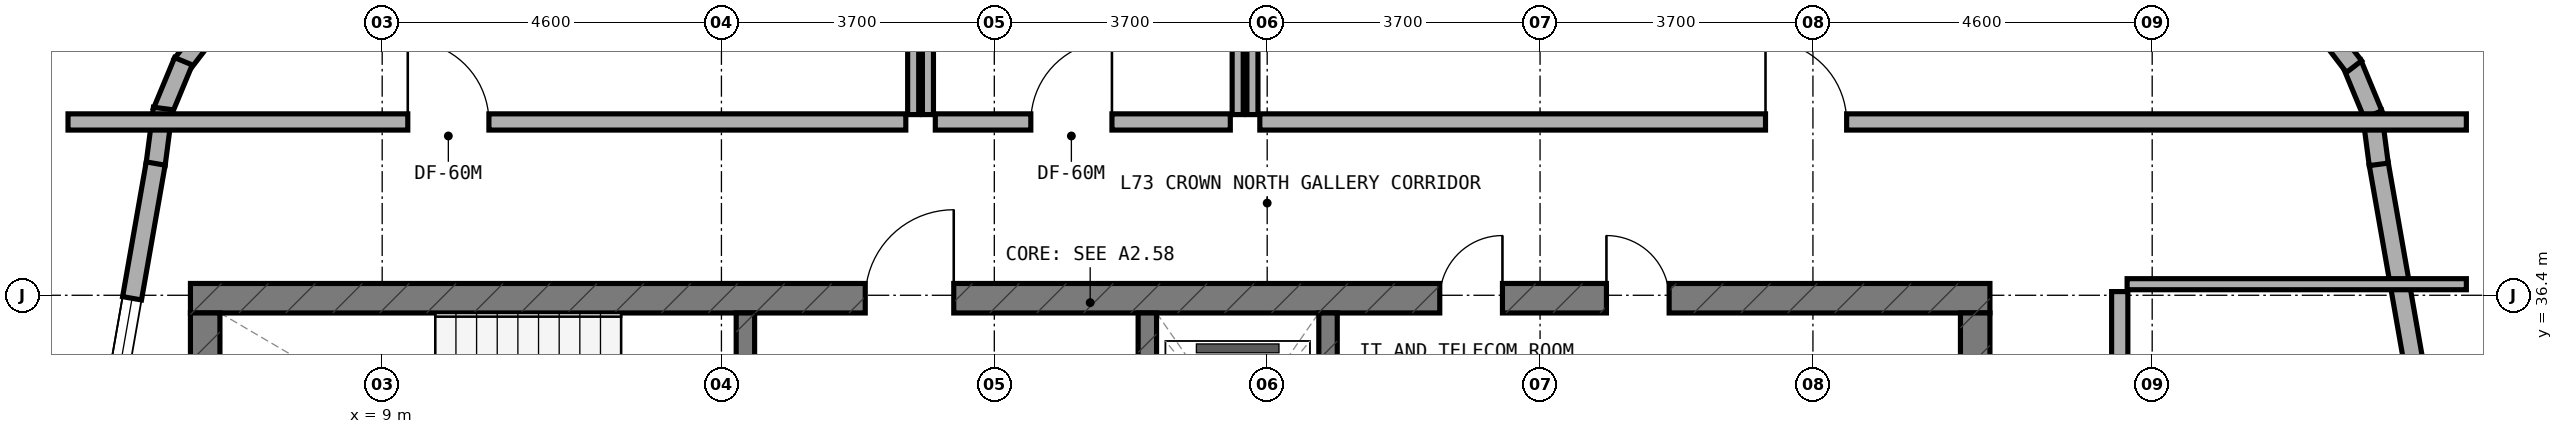
"""IFC4 building model, lengths in metres.
Left out: names, types, materials, properties, quantities, classifications, styles, units other than length and angle.
Written with IfcOpenShell. Run it as: python <this file> out.ifc"""

import sys

from ifc_helpers import new_model, si_unit, direction, frame, frame_2d, origin, place, context, subcontext, project, spatial, rectangle, extrude, element, fill, save


model = new_model("IFC4")
c1 = context("Model", 3, precision=1e-05, world=origin(), true_north=direction((0.0, 1.0)))
c2 = subcontext(c1, "Body", "Model", "MODEL_VIEW")
j1 = project(units=[si_unit("LENGTHUNIT", "METRE"), si_unit("PLANEANGLEUNIT", "RADIAN")], contexts=[c1])
p1 = place(None, origin())
s1 = spatial("IfcSite", under=j1, at=p1, CompositionType="ELEMENT")
p2 = place(p1, origin())
s2 = spatial("IfcBuilding", under=s1, at=p2, CompositionType="ELEMENT")
p3 = place(p2, frame((0.0, 0.0, 268.4)))
s3 = spatial("IfcBuildingStorey", under=s2, at=p3, CompositionType="ELEMENT", Elevation=268.4)
p4 = place(p3, frame((6.4, 36.36, 0.0), z_axis=(0.0, 0.0, 1.0), x_axis=(1.0, 0.0, 0.0)))
e1 = element("IfcWall", 1, at=p4, inside=s3, PredefinedType="SHEAR", context=c2, shape_type="SweptSolid", body=[
    extrude(rectangle(XDim=24.4, YDim=0.4, at=frame_2d((12.2, 0.0))), origin(), (0.0, 0.0, 1.0), 3.6),
])
p5 = place(p4, frame((9.15, 0.0, 0.0)))
e2 = element("IfcOpeningElement", 2, at=p5, cuts=e1, PredefinedType="OPENING", context=c2, shape_type="SweptSolid", body=[
    extrude(rectangle(XDim=1.2, YDim=2.15, at=frame_2d((0.6, 1.075))), frame((0.0, 0.21, 0.0), z_axis=(0.0, -1.0, 0.0), x_axis=(1.0, 0.0, 0.0)), (0.0, 0.0, 1.0), 0.42),
])
p6 = place(p4, frame((19.2, 0.0, 0.0)))
e3 = element("IfcOpeningElement", 3, at=p6, cuts=e1, PredefinedType="OPENING", context=c2, shape_type="SweptSolid", body=[
    extrude(rectangle(XDim=0.85, YDim=2.1, at=frame_2d((0.425, 1.05))), frame((0.0, 0.21, 0.0), z_axis=(0.0, -1.0, 0.0), x_axis=(1.0, 0.0, 0.0)), (0.0, 0.0, 1.0), 0.42),
])
p7 = place(p4, frame((16.94, 0.0, 0.0)))
e4 = element("IfcOpeningElement", 4, at=p7, cuts=e1, PredefinedType="OPENING", context=c2, shape_type="SweptSolid", body=[
    extrude(rectangle(XDim=0.85, YDim=2.1, at=frame_2d((0.425, 1.05))), frame((0.0, 0.21, 0.0), z_axis=(0.0, -1.0, 0.0), x_axis=(1.0, 0.0, 0.0)), (0.0, 0.0, 1.0), 0.42),
])
for number, where, z_axis, x_axis in (
    (5, (6.6, 33.0, 0.0), (0.0, 0.0, 1.0), (0.0, 1.0, 0.0)),
    (6, (30.6, 33.0, 0.0), (0.0, 0.0, 1.0), (0.0, 1.0, 0.0)),
):
    element("IfcWall", number, at=place(p3, frame(where, z_axis=z_axis, x_axis=x_axis)), inside=s3, PredefinedType="SHEAR", context=c2, shape_type="SweptSolid", body=[
        extrude(rectangle(XDim=3.16, YDim=0.4, at=frame_2d((1.58, 0.0))), origin(), (0.0, 0.0, 1.0), 3.6),
    ])
p8 = place(p3, frame((13.925, 33.0, 0.0), z_axis=(0.0, 0.0, 1.0), x_axis=(0.0, 1.0, 0.0)))
e7 = element("IfcWall", 7, at=p8, inside=s3, PredefinedType="STANDARD", context=c2, shape_type="SweptSolid", body=[
    extrude(rectangle(XDim=3.16, YDim=0.25, at=frame_2d((1.58, 0.0))), origin(), (0.0, 0.0, 1.0), 3.32),
])
p9 = place(p8, frame((0.98, 0.0, 0.0)))
e8 = element("IfcOpeningElement", 8, at=p9, cuts=e7, PredefinedType="OPENING", context=c2, shape_type="SweptSolid", body=[
    extrude(rectangle(XDim=1.1, YDim=2.15, at=frame_2d((0.55, 1.075))), frame((0.0, 0.135, 0.0), z_axis=(0.0, -1.0, 0.0), x_axis=(1.0, 0.0, 0.0)), (0.0, 0.0, 1.0), 0.27),
])
p10 = place(p3, frame((19.375, 33.0, 0.0), z_axis=(0.0, 0.0, 1.0), x_axis=(0.0, 1.0, 0.0)))
e9 = element("IfcWall", 9, at=p10, inside=s3, PredefinedType="STANDARD", context=c2, shape_type="SweptSolid", body=[
    extrude(rectangle(XDim=3.16, YDim=0.25, at=frame_2d((1.58, 0.0))), origin(), (0.0, 0.0, 1.0), 3.32),
])
p11 = place(p10, frame((0.98, 0.0, 0.0)))
e10 = element("IfcOpeningElement", 10, at=p11, cuts=e9, PredefinedType="OPENING", context=c2, shape_type="SweptSolid", body=[
    extrude(rectangle(XDim=1.1, YDim=2.15, at=frame_2d((0.55, 1.075))), frame((0.0, 0.135, 0.0), z_axis=(0.0, -1.0, 0.0), x_axis=(1.0, 0.0, 0.0)), (0.0, 0.0, 1.0), 0.27),
])
p12 = place(p3, frame((21.825, 33.0, 0.0), z_axis=(0.0, 0.0, 1.0), x_axis=(0.0, 1.0, 0.0)))
e11 = element("IfcWall", 11, at=p12, inside=s3, PredefinedType="STANDARD", context=c2, shape_type="SweptSolid", body=[
    extrude(rectangle(XDim=3.16, YDim=0.25, at=frame_2d((1.58, 0.0))), origin(), (0.0, 0.0, 1.0), 3.32),
])
p13 = place(p3, frame((37.482, 30.144, 0.0), z_axis=(0.0, 0.0, 1.0), x_axis=(-0.172801004781, 0.98495675679, 0.0)))
e12 = element("IfcWall", 12, at=p13, inside=s3, PredefinedType="STANDARD", context=c2, shape_type="SweptSolid", body=[
    extrude(rectangle(XDim=8.165, YDim=0.26, at=frame_2d((4.083, 0.0))), origin(), (0.0, 0.0, 1.0), 3.32),
])
p14 = place(p13, frame((2.144, 0.0, 0.85)))
e13 = element("IfcOpeningElement", 13, at=p14, cuts=e12, PredefinedType="OPENING", context=c2, shape_type="SweptSolid", body=[
    extrude(rectangle(XDim=2.1, YDim=1.5, at=frame_2d((1.05, 0.75))), frame((0.0, 0.14, 0.0), z_axis=(0.0, -1.0, 0.0), x_axis=(1.0, 0.0, 0.0)), (0.0, 0.0, 1.0), 0.28),
])
p15 = place(p3, frame((36.072, 38.175, 0.0), z_axis=(0.0, 0.0, 1.0), x_axis=(-0.130255288807, 0.991480488834, 0.0)))
e14 = element("IfcWall", 14, at=p15, inside=s3, PredefinedType="STANDARD", context=c2, shape_type="SweptSolid", body=[
    extrude(rectangle(XDim=0.729, YDim=0.26, at=frame_2d((0.365, 0.0))), origin(), (0.0, 0.0, 1.0), 3.32),
])
for number, where, z_axis, x_axis in (
    (15, (35.995, 38.852, 0.0), (0.0, 0.0, 1.0), (-0.384, 0.924, 0.0)),
    (16, (35.737, 39.501, 0.0), (0.0, 0.0, 1.0), (-0.609, 0.793, 0.0)),
    (17, (6.738, 40.121, 0.0), (0.0, 0.0, 1.0), (-0.609, -0.793, 0.0)),
):
    element("IfcWall", number, at=place(p3, frame(where, z_axis=z_axis, x_axis=x_axis)), inside=s3, PredefinedType="STANDARD", context=c2, shape_type="SweptSolid", body=[
        extrude(rectangle(XDim=0.746, YDim=0.26, at=frame_2d((0.373, 0.0))), origin(), (0.0, 0.0, 1.0), 3.32),
    ])
p16 = place(p3, frame((6.305, 39.573, 0.0), z_axis=(0.0, 0.0, 1.0), x_axis=(-0.383267045233, -0.923637576129, 0.0)))
e18 = element("IfcWall", 18, at=p16, inside=s3, PredefinedType="STANDARD", context=c2, shape_type="SweptSolid", body=[
    extrude(rectangle(XDim=0.746, YDim=0.26, at=frame_2d((0.373, 0.0))), origin(), (0.0, 0.0, 1.0), 3.32),
])
p17 = place(p3, frame((6.027, 38.933, 0.0), z_axis=(0.0, 0.0, 1.0), x_axis=(-0.129653178221, -0.991559404866, 0.0)))
e19 = element("IfcWall", 19, at=p17, inside=s3, PredefinedType="STANDARD", context=c2, shape_type="SweptSolid", body=[
    extrude(rectangle(XDim=0.764, YDim=0.26, at=frame_2d((0.382, 0.0))), origin(), (0.0, 0.0, 1.0), 3.32),
])
p18 = place(p3, frame((5.929, 38.186, 0.0), z_axis=(0.0, 0.0, 1.0), x_axis=(-0.172801004781, -0.98495675679, 0.0)))
e20 = element("IfcWall", 20, at=p18, inside=s3, PredefinedType="STANDARD", context=c2, shape_type="SweptSolid", body=[
    extrude(rectangle(XDim=8.165, YDim=0.26, at=frame_2d((4.083, 0.0))), origin(), (0.0, 0.0, 1.0), 3.32),
])
p19 = place(p18, frame((1.855, 0.0, 0.85)))
e21 = element("IfcOpeningElement", 21, at=p19, cuts=e20, PredefinedType="OPENING", context=c2, shape_type="SweptSolid", body=[
    extrude(rectangle(XDim=2.1, YDim=1.5, at=frame_2d((1.05, 0.75))), frame((0.0, 0.14, 0.0), z_axis=(0.0, -1.0, 0.0), x_axis=(1.0, 0.0, 0.0)), (0.0, 0.0, 1.0), 0.28),
])
p20 = place(p18, frame((6.348, 0.0, 0.85)))
e22 = element("IfcOpeningElement", 22, at=p20, cuts=e20, PredefinedType="OPENING", context=c2, shape_type="SweptSolid", body=[
    extrude(rectangle(XDim=1.5, YDim=1.5, at=frame_2d((0.75, 0.75))), frame((0.0, 0.14, 0.0), z_axis=(0.0, -1.0, 0.0), x_axis=(1.0, 0.0, 0.0)), (0.0, 0.0, 1.0), 0.28),
])
p21 = place(p3, frame((32.66, 36.55, 0.0), z_axis=(0.0, 0.0, 1.0), x_axis=(1.0, 0.0, 0.0)))
e23 = element("IfcWall", 23, at=p21, inside=s3, PredefinedType="PARTITIONING", context=c2, shape_type="SweptSolid", body=[
    extrude(rectangle(XDim=4.6, YDim=0.15, at=frame_2d((2.3, 0.0))), origin(), (0.0, 0.0, 1.0), 2.795),
])
p22 = place(p3, frame((32.56, 13.55, 0.0), z_axis=(0.0, 0.0, 1.0), x_axis=(0.0, 1.0, 0.0)))
e24 = element("IfcWall", 24, at=p22, inside=s3, PredefinedType="SOLIDWALL", context=c2, shape_type="SweptSolid", body=[
    extrude(rectangle(XDim=22.9, YDim=0.22, at=frame_2d((11.45, 0.0))), origin(), (0.0, 0.0, 1.0), 2.795),
])
p23 = place(p22, frame((9.8, 0.0, 0.0)))
e25 = element("IfcOpeningElement", 25, at=p23, cuts=e24, PredefinedType="OPENING", context=c2, shape_type="SweptSolid", body=[
    extrude(rectangle(XDim=1.1, YDim=2.1, at=frame_2d((0.55, 1.05))), frame((0.0, 0.12, 0.0), z_axis=(0.0, -1.0, 0.0), x_axis=(1.0, 0.0, 0.0)), (0.0, 0.0, 1.0), 0.24),
])
p24 = place(p3, frame((16.2, 38.85, 0.0), z_axis=(0.0, 0.0, 1.0), x_axis=(0.0, 1.0, 0.0)))
e26 = element("IfcWall", 26, at=p24, inside=s3, PredefinedType="PARTITIONING", context=c2, shape_type="SweptSolid", body=[
    extrude(rectangle(XDim=3.21, YDim=0.15, at=frame_2d((1.605, 0.0))), origin(), (0.0, 0.0, 1.0), 2.795),
])
p25 = place(p3, frame((4.74, 38.75, 0.0), z_axis=(0.0, 0.0, 1.0), x_axis=(1.0, 0.0, 0.0)))
e27 = element("IfcWall", 27, at=p25, inside=s3, PredefinedType="SOLIDWALL", context=c2, shape_type="SweptSolid", body=[
    extrude(rectangle(XDim=11.36, YDim=0.22, at=frame_2d((5.68, 0.0))), origin(), (0.0, 0.0, 1.0), 2.795),
])
p26 = place(p25, frame((4.607, 0.0, 0.0)))
e28 = element("IfcOpeningElement", 28, at=p26, cuts=e27, PredefinedType="OPENING", context=c2, shape_type="SweptSolid", body=[
    extrude(rectangle(XDim=1.1, YDim=2.1, at=frame_2d((0.55, 1.05))), frame((0.0, 0.12, 0.0), z_axis=(0.0, -1.0, 0.0), x_axis=(1.0, 0.0, 0.0)), (0.0, 0.0, 1.0), 0.24),
])
for number, where, z_axis, x_axis in (
    (29, (16.4, 38.85, 0.0), (0.0, 0.0, 1.0), (0.0, 1.0, 0.0)),
    (30, (20.6, 38.85, 0.0), (0.0, 0.0, 1.0), (0.0, 1.0, 0.0)),
):
    element("IfcWall", number, at=place(p3, frame(where, z_axis=z_axis, x_axis=x_axis)), inside=s3, PredefinedType="PARTITIONING", context=c2, shape_type="SweptSolid", body=[
        extrude(rectangle(XDim=3.21, YDim=0.15, at=frame_2d((1.605, 0.0))), origin(), (0.0, 0.0, 1.0), 3.015),
    ])
p27 = place(p3, frame((16.5, 38.75, 0.0), z_axis=(0.0, 0.0, 1.0), x_axis=(1.0, 0.0, 0.0)))
e31 = element("IfcWall", 31, at=p27, inside=s3, PredefinedType="SOLIDWALL", context=c2, shape_type="SweptSolid", body=[
    extrude(rectangle(XDim=4.0, YDim=0.22, at=frame_2d((2.0, 0.0))), origin(), (0.0, 0.0, 1.0), 2.995),
])
p28 = place(p27, frame((1.295, 0.0, 0.0)))
e32 = element("IfcOpeningElement", 32, at=p28, cuts=e31, PredefinedType="OPENING", context=c2, shape_type="SweptSolid", body=[
    extrude(rectangle(XDim=1.1, YDim=2.1, at=frame_2d((0.55, 1.05))), frame((0.0, 0.12, 0.0), z_axis=(0.0, -1.0, 0.0), x_axis=(1.0, 0.0, 0.0)), (0.0, 0.0, 1.0), 0.24),
])
p29 = place(p3, frame((20.8, 38.85, 0.0), z_axis=(0.0, 0.0, 1.0), x_axis=(0.0, 1.0, 0.0)))
e33 = element("IfcWall", 33, at=p29, inside=s3, PredefinedType="PARTITIONING", context=c2, shape_type="SweptSolid", body=[
    extrude(rectangle(XDim=3.21, YDim=0.15, at=frame_2d((1.605, 0.0))), origin(), (0.0, 0.0, 1.0), 3.015),
])
p30 = place(p3, frame((20.9, 38.75, 0.0), z_axis=(0.0, 0.0, 1.0), x_axis=(1.0, 0.0, 0.0)))
e34 = element("IfcWall", 34, at=p30, inside=s3, PredefinedType="SOLIDWALL", context=c2, shape_type="SweptSolid", body=[
    extrude(rectangle(XDim=16.36, YDim=0.22, at=frame_2d((8.18, 0.0))), origin(), (0.0, 0.0, 1.0), 2.795),
])
p31 = place(p30, frame((6.857, 0.0, 0.0)))
e35 = element("IfcOpeningElement", 35, at=p31, cuts=e34, PredefinedType="OPENING", context=c2, shape_type="SweptSolid", body=[
    extrude(rectangle(XDim=1.1, YDim=2.1, at=frame_2d((0.55, 1.05))), frame((0.0, 0.12, 0.0), z_axis=(0.0, -1.0, 0.0), x_axis=(1.0, 0.0, 0.0)), (0.0, 0.0, 1.0), 0.24),
])
p32 = place(p19, origin())
e36 = element("IfcWindow", 36, at=p32, inside=s3, PartitioningType="SINGLE_PANEL", PredefinedType="WINDOW", context=c2, shape_type="SweptSolid", body=[
    extrude(rectangle(XDim=2.1, YDim=1.5, at=frame_2d((1.05, 0.75))), frame((0.0, 0.03, 0.0), z_axis=(0.0, -1.0, 0.0), x_axis=(1.0, 0.0, 0.0)), (0.0, 0.0, 1.0), 0.06),
])
fill(e21, e36)
p33 = place(p5, origin())
e37 = element("IfcDoor", 37, at=p33, inside=s3, OperationType="SINGLE_SWING_RIGHT", PredefinedType="DOOR", context=c2, shape_type="SweptSolid", body=[
    extrude(rectangle(XDim=1.2, YDim=2.15, at=frame_2d((0.6, 1.075))), frame((0.0, 0.025, 0.0), z_axis=(0.0, -1.0, 0.0), x_axis=(1.0, 0.0, 0.0)), (0.0, 0.0, 1.0), 0.05),
])
fill(e2, e37)
p34 = place(p6, origin())
e38 = element("IfcDoor", 38, at=p34, inside=s3, OperationType="SINGLE_SWING_LEFT", PredefinedType="DOOR", context=c2, shape_type="SweptSolid", body=[
    extrude(rectangle(XDim=0.85, YDim=2.1, at=frame_2d((0.425, 1.05))), frame((0.0, 0.025, 0.0), z_axis=(0.0, -1.0, 0.0), x_axis=(1.0, 0.0, 0.0)), (0.0, 0.0, 1.0), 0.05),
])
fill(e3, e38)
p35 = place(p7, origin())
e39 = element("IfcDoor", 39, at=p35, inside=s3, OperationType="SINGLE_SWING_RIGHT", PredefinedType="DOOR", context=c2, shape_type="SweptSolid", body=[
    extrude(rectangle(XDim=0.85, YDim=2.1, at=frame_2d((0.425, 1.05))), frame((0.0, 0.025, 0.0), z_axis=(0.0, -1.0, 0.0), x_axis=(1.0, 0.0, 0.0)), (0.0, 0.0, 1.0), 0.05),
])
fill(e4, e39)
p36 = place(p26, origin())
e40 = element("IfcDoor", 40, at=p36, inside=s3, OperationType="SINGLE_SWING_LEFT", PredefinedType="DOOR", context=c2, shape_type="SweptSolid", body=[
    extrude(rectangle(XDim=1.1, YDim=2.1, at=frame_2d((0.55, 1.05))), frame((0.0, 0.025, 0.0), z_axis=(0.0, -1.0, 0.0), x_axis=(1.0, 0.0, 0.0)), (0.0, 0.0, 1.0), 0.05),
])
fill(e28, e40)
p37 = place(p28, origin())
e41 = element("IfcDoor", 41, at=p37, inside=s3, OperationType="SINGLE_SWING_RIGHT", PredefinedType="DOOR", context=c2, shape_type="SweptSolid", body=[
    extrude(rectangle(XDim=1.1, YDim=2.1, at=frame_2d((0.55, 1.05))), frame((0.0, 0.025, 0.0), z_axis=(0.0, -1.0, 0.0), x_axis=(1.0, 0.0, 0.0)), (0.0, 0.0, 1.0), 0.05),
])
fill(e32, e41)
p38 = place(p31, origin())
e42 = element("IfcDoor", 42, at=p38, inside=s3, OperationType="SINGLE_SWING_LEFT", PredefinedType="DOOR", context=c2, shape_type="SweptSolid", body=[
    extrude(rectangle(XDim=1.1, YDim=2.1, at=frame_2d((0.55, 1.05))), frame((0.0, 0.025, 0.0), z_axis=(0.0, -1.0, 0.0), x_axis=(1.0, 0.0, 0.0)), (0.0, 0.0, 1.0), 0.05),
])
fill(e35, e42)
save(model, sys.argv[1])
